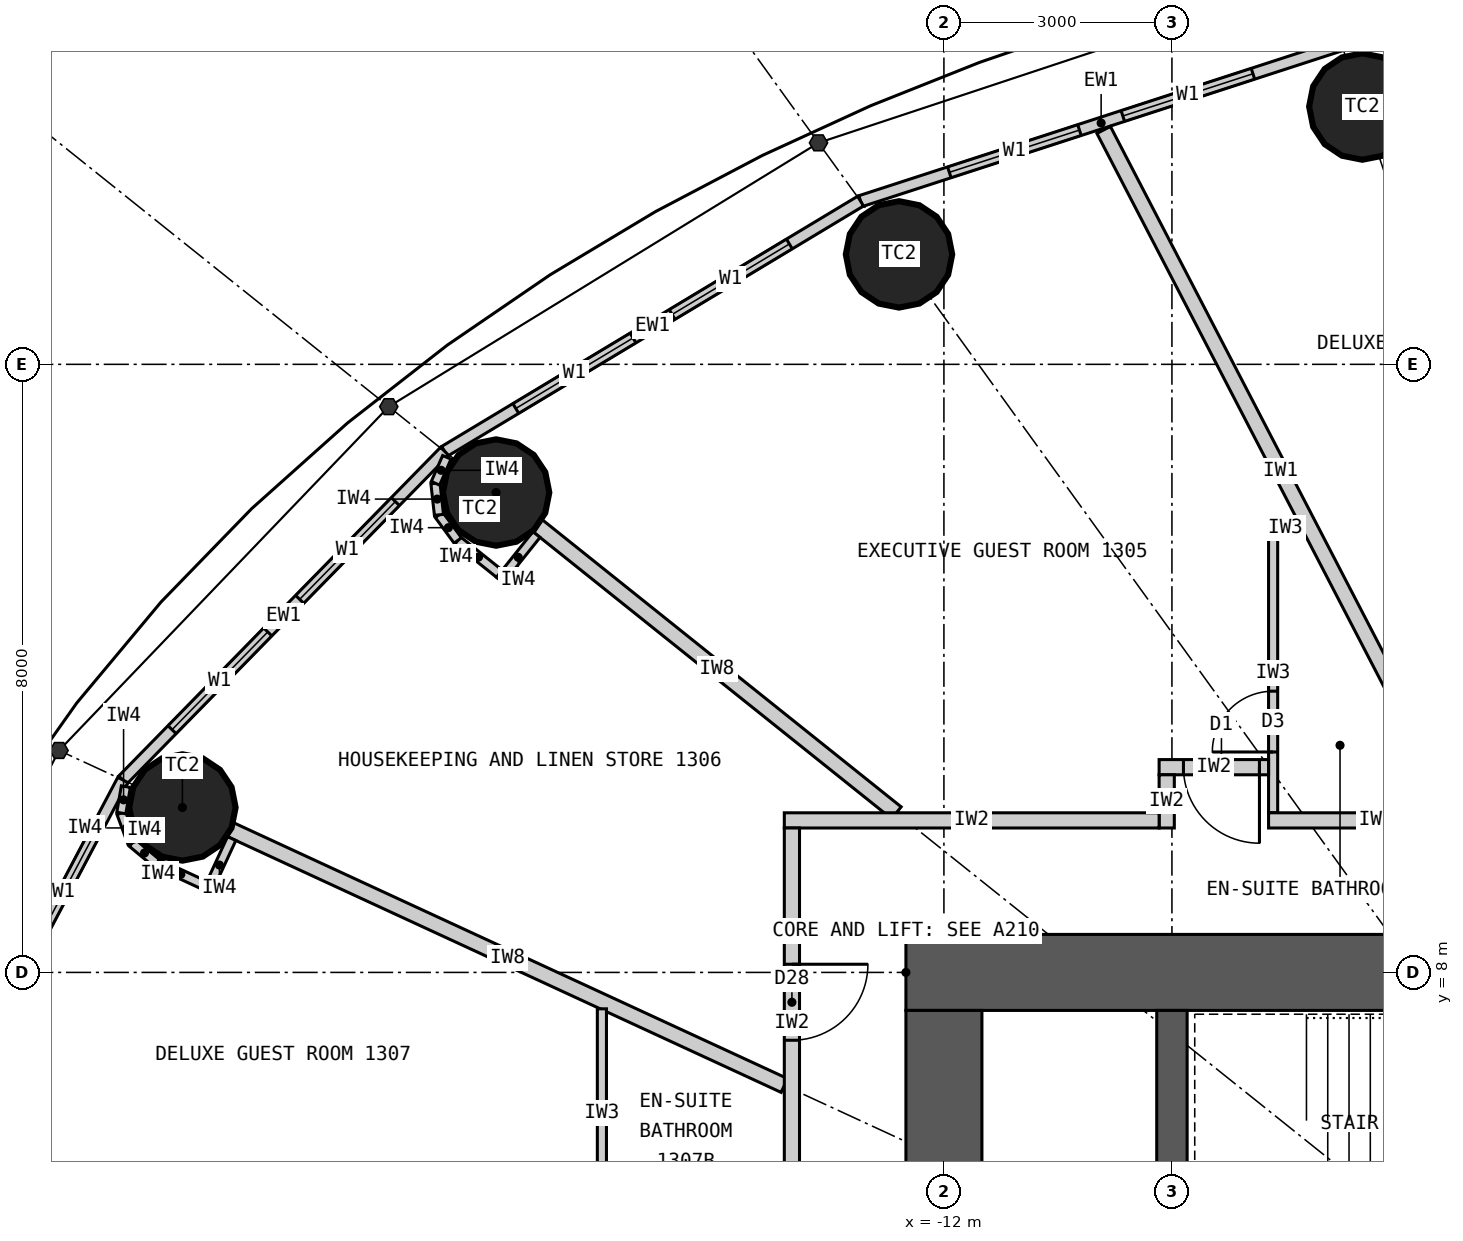
"""IFC4 building model, lengths in metres.
Left out: names, types, materials, properties, quantities, classifications, styles, units other than length and angle.
Written with IfcOpenShell. Run it as: python <this file> out.ifc"""

import sys

from ifc_helpers import new_model, si_unit, direction, frame, frame_2d, origin, origin_2d, place, context, subcontext, project, spatial, rectangle, circle, extrude, element, fill, save


model = new_model("IFC4")
c1 = context("Model", 3, precision=1e-05, world=origin(), true_north=direction((0.0, 1.0)))
c2 = subcontext(c1, "Body", "Model", "MODEL_VIEW")
j1 = project(units=[si_unit("LENGTHUNIT", "METRE"), si_unit("PLANEANGLEUNIT", "RADIAN")], contexts=[c1])
p1 = place(None, origin())
s1 = spatial("IfcSite", under=j1, at=p1, CompositionType="ELEMENT")
p2 = place(p1, origin())
s2 = spatial("IfcBuilding", under=s1, at=p2, CompositionType="ELEMENT")
p3 = place(p2, frame((0.0, 0.0, 57.3)))
s3 = spatial("IfcBuildingStorey", under=s2, at=p3, CompositionType="ELEMENT", Elevation=57.3)
for number, where, z_axis, x_axis in (
    (1, (-6.495, 19.391, 0.0), (0.0, 0.0, 1.0), (1.0, 0.0, 0.0)),
    (2, (-12.591, 17.447, 0.0), (0.0, 0.0, 1.0), (1.0, 0.0, 0.0)),
    (3, (-17.892, 14.313, 0.0), (0.0, 0.0, 1.0), (1.0, 0.0, 0.0)),
    (4, (-22.019, 10.17, 0.0), (0.0, 0.0, 1.0), (1.0, 0.0, 0.0)),
):
    element("IfcColumn", number, at=place(p3, frame(where, z_axis=z_axis, x_axis=x_axis)), inside=s3, PredefinedType="COLUMN", context=c2, shape_type="SweptSolid", body=[
        extrude(circle(Radius=0.7, at=origin_2d()), origin(), (0.0, 0.0, 1.0), 3.3),
    ])
p4 = place(p3, frame((-12.5, 8.0, 0.0), z_axis=(0.0, 0.0, 1.0), x_axis=(1.0, 0.0, 0.0)))
e5 = element("IfcWall", 5, at=p4, inside=s3, PredefinedType="SHEAR", context=c2, shape_type="SweptSolid", body=[
    extrude(rectangle(XDim=25.0, YDim=1.0, at=frame_2d((12.5, 0.0))), origin(), (0.0, 0.0, 1.0), 3.3),
])
p5 = place(p4, frame((11.2, 0.0, 0.0)))
e6 = element("IfcOpeningElement", 6, at=p5, cuts=e5, PredefinedType="OPENING", context=c2, shape_type="SweptSolid", body=[
    extrude(rectangle(XDim=1.2, YDim=2.2, at=frame_2d((0.6, 1.1))), frame((0.0, 0.51, 0.0), z_axis=(0.0, -1.0, 0.0), x_axis=(1.0, 0.0, 0.0)), (0.0, 0.0, 1.0), 1.02),
])
p6 = place(p4, frame((18.8, 0.0, 0.0)))
e7 = element("IfcOpeningElement", 7, at=p6, cuts=e5, PredefinedType="OPENING", context=c2, shape_type="SweptSolid", body=[
    extrude(rectangle(XDim=0.9, YDim=2.2, at=frame_2d((0.45, 1.1))), frame((0.0, 0.51, 0.0), z_axis=(0.0, -1.0, 0.0), x_axis=(1.0, 0.0, 0.0)), (0.0, 0.0, 1.0), 1.02),
])
p7 = place(p3, frame((-12.0, 7.5, 0.0), z_axis=(0.0, 0.0, 1.0), x_axis=(0.0, -1.0, 0.0)))
e8 = element("IfcWall", 8, at=p7, inside=s3, PredefinedType="SHEAR", context=c2, shape_type="SweptSolid", body=[
    extrude(rectangle(XDim=15.0, YDim=1.0, at=frame_2d((7.5, 0.0))), origin(), (0.0, 0.0, 1.0), 3.3),
])
p8 = place(p7, frame((6.6, 0.0, 0.0)))
e9 = element("IfcOpeningElement", 9, at=p8, cuts=e8, PredefinedType="OPENING", context=c2, shape_type="SweptSolid", body=[
    extrude(rectangle(XDim=1.8, YDim=2.2, at=frame_2d((0.9, 1.1))), frame((0.0, 0.51, 0.0), z_axis=(0.0, -1.0, 0.0), x_axis=(1.0, 0.0, 0.0)), (0.0, 0.0, 1.0), 1.02),
])
p9 = place(p3, frame((-9.0, 4.5, 0.0), z_axis=(0.0, 0.0, 1.0), x_axis=(0.0, 1.0, 0.0)))
e10 = element("IfcWall", 10, at=p9, inside=s3, PredefinedType="SHEAR", context=c2, shape_type="SweptSolid", body=[
    extrude(rectangle(XDim=3.0, YDim=0.4, at=frame_2d((1.5, 0.0))), origin(), (0.0, 0.0, 1.0), 3.3),
])
p10 = place(p3, frame((-6.766, 20.202, 0.0), z_axis=(0.0, 0.0, 1.0), x_axis=(-0.951137534625, -0.308767534285, 0.0)))
e11 = element("IfcWall", 11, at=p10, inside=s3, PredefinedType="ELEMENTEDWALL", context=c2, shape_type="SweptSolid", body=[
    extrude(rectangle(XDim=6.655, YDim=0.15, at=frame_2d((3.328, 0.0))), origin(), (0.0, 0.0, 1.0), 3.12),
])
p11 = place(p10, frame((1.228, 0.0, 0.9)))
e12 = element("IfcOpeningElement", 12, at=p11, cuts=e11, PredefinedType="OPENING", context=c2, shape_type="SweptSolid", body=[
    extrude(rectangle(XDim=1.8, YDim=1.9, at=frame_2d((0.9, 0.95))), frame((0.0, 0.085, 0.0), z_axis=(0.0, -1.0, 0.0), x_axis=(1.0, 0.0, 0.0)), (0.0, 0.0, 1.0), 0.17),
])
p12 = place(p10, frame((3.628, 0.0, 0.9)))
e13 = element("IfcOpeningElement", 13, at=p12, cuts=e11, PredefinedType="OPENING", context=c2, shape_type="SweptSolid", body=[
    extrude(rectangle(XDim=1.8, YDim=1.9, at=frame_2d((0.9, 0.95))), frame((0.0, 0.085, 0.0), z_axis=(0.0, -1.0, 0.0), x_axis=(1.0, 0.0, 0.0)), (0.0, 0.0, 1.0), 0.17),
])
p13 = place(p3, frame((-13.096, 18.147, 0.0), z_axis=(0.0, 0.0, 1.0), x_axis=(-0.856983180864, -0.515344377787, 0.0)))
e14 = element("IfcWall", 14, at=p13, inside=s3, PredefinedType="ELEMENTEDWALL", context=c2, shape_type="SweptSolid", body=[
    extrude(rectangle(XDim=6.386, YDim=0.15, at=frame_2d((3.193, 0.0))), origin(), (0.0, 0.0, 1.0), 3.12),
])
p14 = place(p13, frame((1.093, 0.0, 0.9)))
e15 = element("IfcOpeningElement", 15, at=p14, cuts=e14, PredefinedType="OPENING", context=c2, shape_type="SweptSolid", body=[
    extrude(rectangle(XDim=1.8, YDim=1.9, at=frame_2d((0.9, 0.95))), frame((0.0, 0.085, 0.0), z_axis=(0.0, -1.0, 0.0), x_axis=(1.0, 0.0, 0.0)), (0.0, 0.0, 1.0), 0.17),
])
p15 = place(p13, frame((3.493, 0.0, 0.9)))
e16 = element("IfcOpeningElement", 16, at=p15, cuts=e14, PredefinedType="OPENING", context=c2, shape_type="SweptSolid", body=[
    extrude(rectangle(XDim=1.8, YDim=1.9, at=frame_2d((0.9, 0.95))), frame((0.0, 0.085, 0.0), z_axis=(0.0, -1.0, 0.0), x_axis=(1.0, 0.0, 0.0)), (0.0, 0.0, 1.0), 0.17),
])
p16 = place(p3, frame((-18.57, 14.856, 0.0), z_axis=(0.0, 0.0, 1.0), x_axis=(-0.699602905915, -0.714531856557, 0.0)))
e17 = element("IfcWall", 17, at=p16, inside=s3, PredefinedType="ELEMENTEDWALL", context=c2, shape_type="SweptSolid", body=[
    extrude(rectangle(XDim=6.051, YDim=0.15, at=frame_2d((3.025, 0.0))), origin(), (0.0, 0.0, 1.0), 3.12),
])
p17 = place(p16, frame((0.926, 0.0, 0.9)))
e18 = element("IfcOpeningElement", 18, at=p17, cuts=e17, PredefinedType="OPENING", context=c2, shape_type="SweptSolid", body=[
    extrude(rectangle(XDim=1.8, YDim=1.9, at=frame_2d((0.9, 0.95))), frame((0.0, 0.085, 0.0), z_axis=(0.0, -1.0, 0.0), x_axis=(1.0, 0.0, 0.0)), (0.0, 0.0, 1.0), 0.17),
])
p18 = place(p16, frame((3.325, 0.0, 0.9)))
e19 = element("IfcOpeningElement", 19, at=p18, cuts=e17, PredefinedType="OPENING", context=c2, shape_type="SweptSolid", body=[
    extrude(rectangle(XDim=1.8, YDim=1.9, at=frame_2d((0.9, 0.95))), frame((0.0, 0.085, 0.0), z_axis=(0.0, -1.0, 0.0), x_axis=(1.0, 0.0, 0.0)), (0.0, 0.0, 1.0), 0.17),
])
p19 = place(p3, frame((-22.803, 10.532, 0.0), z_axis=(0.0, 0.0, 1.0), x_axis=(-0.467296867008, -0.884100468321, 0.0)))
e20 = element("IfcWall", 20, at=p19, inside=s3, PredefinedType="ELEMENTEDWALL", context=c2, shape_type="SweptSolid", body=[
    extrude(rectangle(XDim=5.734, YDim=0.15, at=frame_2d((2.867, 0.0))), origin(), (0.0, 0.0, 1.0), 3.12),
])
p20 = place(p19, frame((0.767, 0.0, 0.9)))
e21 = element("IfcOpeningElement", 21, at=p20, cuts=e20, PredefinedType="OPENING", context=c2, shape_type="SweptSolid", body=[
    extrude(rectangle(XDim=1.8, YDim=1.9, at=frame_2d((0.9, 0.95))), frame((0.0, 0.085, 0.0), z_axis=(0.0, -1.0, 0.0), x_axis=(1.0, 0.0, 0.0)), (0.0, 0.0, 1.0), 0.17),
])
p21 = place(p19, frame((3.167, 0.0, 0.9)))
e22 = element("IfcOpeningElement", 22, at=p21, cuts=e20, PredefinedType="OPENING", context=c2, shape_type="SweptSolid", body=[
    extrude(rectangle(XDim=1.8, YDim=1.9, at=frame_2d((0.9, 0.95))), frame((0.0, 0.085, 0.0), z_axis=(0.0, -1.0, 0.0), x_axis=(1.0, 0.0, 0.0)), (0.0, 0.0, 1.0), 0.17),
])
p22 = place(p3, frame((-5.239, 10.1, 0.0), z_axis=(0.0, 0.0, 1.0), x_axis=(-0.460422783389, 0.887699758103, 0.0)))
e23 = element("IfcWall", 23, at=p22, inside=s3, PredefinedType="PARTITIONING", context=c2, shape_type="SweptSolid", body=[
    extrude(rectangle(XDim=10.12, YDim=0.2, at=frame_2d((5.06, 0.0))), origin(), (0.0, 0.0, 1.0), 3.12),
])
p23 = place(p3, frame((-12.625, 10.1, 0.0), z_axis=(0.0, 0.0, 1.0), x_axis=(-0.780892451574, 0.624665493744, 0.0)))
e24 = element("IfcWall", 24, at=p23, inside=s3, PredefinedType="PARTITIONING", context=c2, shape_type="SweptSolid", body=[
    extrude(rectangle(XDim=6.045, YDim=0.2, at=frame_2d((3.022, 0.0))), origin(), (0.0, 0.0, 1.0), 2.32),
])
p24 = place(p3, frame((-14.1, 6.512, 0.0), z_axis=(0.0, 0.0, 1.0), x_axis=(-0.907832871056, 0.419332181247, 0.0)))
e25 = element("IfcWall", 25, at=p24, inside=s3, PredefinedType="PARTITIONING", context=c2, shape_type="SweptSolid", body=[
    extrude(rectangle(XDim=8.023, YDim=0.2, at=frame_2d((4.011, 0.0))), origin(), (0.0, 0.0, 1.0), 2.32),
])
p25 = place(p3, frame((-7.284, 13.85, 0.0), z_axis=(0.0, 0.0, 1.0), x_axis=(-1.0, 0.0, 0.0)))
e26 = element("IfcWall", 26, at=p25, inside=s3, PredefinedType="PARTITIONING", context=c2, shape_type="SweptSolid", body=[
    extrude(rectangle(XDim=0.445, YDim=0.12, at=frame_2d((0.222, 0.0))), origin(), (0.0, 0.0, 1.0), 3.12),
])
p26 = place(p3, frame((-7.669, 10.1, 0.0), z_axis=(0.0, 0.0, 1.0), x_axis=(0.0, 1.0, 0.0)))
e27 = element("IfcWall", 27, at=p26, inside=s3, PredefinedType="PARTITIONING", context=c2, shape_type="SweptSolid", body=[
    extrude(rectangle(XDim=3.69, YDim=0.12, at=frame_2d((1.845, 0.0))), origin(), (0.0, 0.0, 1.0), 3.12),
])
p27 = place(p26, frame((0.8, 0.0, 0.0)))
e28 = element("IfcOpeningElement", 28, at=p27, cuts=e27, PredefinedType="OPENING", context=c2, shape_type="SweptSolid", body=[
    extrude(rectangle(XDim=0.8, YDim=2.1, at=frame_2d((0.4, 1.05))), frame((0.0, 0.07, 0.0), z_axis=(0.0, -1.0, 0.0), x_axis=(1.0, 0.0, 0.0)), (0.0, 0.0, 1.0), 0.14),
])
p28 = place(p3, frame((-16.5, 7.521, 0.0), z_axis=(0.0, 0.0, 1.0), x_axis=(0.0, -1.0, 0.0)))
e29 = element("IfcWall", 29, at=p28, inside=s3, PredefinedType="PARTITIONING", context=c2, shape_type="SweptSolid", body=[
    extrude(rectangle(XDim=2.749, YDim=0.12, at=frame_2d((1.374, 0.0))), origin(), (0.0, 0.0, 1.0), 3.12),
])
p29 = place(p3, frame((-9.169, 10.7, 0.0), z_axis=(0.0, 0.0, 1.0), x_axis=(1.0, 0.0, 0.0)))
e30 = element("IfcWall", 30, at=p29, inside=s3, PredefinedType="PARTITIONING", context=c2, shape_type="SweptSolid", body=[
    extrude(rectangle(XDim=1.44, YDim=0.2, at=frame_2d((0.72, 0.0))), origin(), (0.0, 0.0, 1.0), 3.12),
])
p30 = place(p29, frame((0.32, 0.0, 0.0)))
e31 = element("IfcOpeningElement", 31, at=p30, cuts=e30, PredefinedType="OPENING", context=c2, shape_type="SweptSolid", body=[
    extrude(rectangle(XDim=1.0, YDim=2.2, at=frame_2d((0.5, 1.1))), frame((0.0, 0.11, 0.0), z_axis=(0.0, -1.0, 0.0), x_axis=(1.0, 0.0, 0.0)), (0.0, 0.0, 1.0), 0.22),
])
p31 = place(p3, frame((-9.069, 9.9, 0.0), z_axis=(0.0, 0.0, 1.0), x_axis=(0.0, 1.0, 0.0)))
e32 = element("IfcWall", 32, at=p31, inside=s3, PredefinedType="PARTITIONING", context=c2, shape_type="SweptSolid", body=[
    extrude(rectangle(XDim=0.7, YDim=0.2, at=frame_2d((0.35, 0.0))), origin(), (0.0, 0.0, 1.0), 3.12),
])
p32 = place(p3, frame((-14.1, 10.0, 0.0), z_axis=(0.0, 0.0, 1.0), x_axis=(1.0, 0.0, 0.0)))
e33 = element("IfcWall", 33, at=p32, inside=s3, PredefinedType="PARTITIONING", context=c2, shape_type="SweptSolid", body=[
    extrude(rectangle(XDim=4.931, YDim=0.2, at=frame_2d((2.466, 0.0))), origin(), (0.0, 0.0, 1.0), 3.12),
])
p33 = place(p3, frame((-7.729, 10.0, 0.0), z_axis=(0.0, 0.0, 1.0), x_axis=(1.0, 0.0, 0.0)))
e34 = element("IfcWall", 34, at=p33, inside=s3, PredefinedType="PARTITIONING", context=c2, shape_type="SweptSolid", body=[
    extrude(rectangle(XDim=2.833, YDim=0.2, at=frame_2d((1.417, 0.0))), origin(), (0.0, 0.0, 1.0), 3.12),
])
p34 = place(p3, frame((-14.0, 9.9, 0.0), z_axis=(0.0, 0.0, 1.0), x_axis=(0.0, -1.0, 0.0)))
e35 = element("IfcWall", 35, at=p34, inside=s3, PredefinedType="PARTITIONING", context=c2, shape_type="SweptSolid", body=[
    extrude(rectangle(XDim=5.127, YDim=0.2, at=frame_2d((2.564, 0.0))), origin(), (0.0, 0.0, 1.0), 3.12),
])
p35 = place(p34, frame((1.792, 0.0, 0.0)))
e36 = element("IfcOpeningElement", 36, at=p35, cuts=e35, PredefinedType="OPENING", context=c2, shape_type="SweptSolid", body=[
    extrude(rectangle(XDim=1.0, YDim=2.2, at=frame_2d((0.5, 1.1))), frame((0.0, 0.11, 0.0), z_axis=(0.0, -1.0, 0.0), x_axis=(1.0, 0.0, 0.0)), (0.0, 0.0, 1.0), 0.22),
])
p36 = place(p3, frame((-17.361, 13.76, 0.0), z_axis=(0.0, 0.0, 1.0), x_axis=(-0.624501042889, -0.781023973659, 0.0)))
e37 = element("IfcWall", 37, at=p36, inside=s3, PredefinedType="PARTITIONING", context=c2, shape_type="SweptSolid", body=[
    extrude(rectangle(XDim=0.767, YDim=0.12, at=frame_2d((0.384, 0.0))), origin(), (0.0, 0.0, 1.0), 3.12),
])
p37 = place(p3, frame((-17.85, 13.246, 0.0), z_axis=(0.0, 0.0, 1.0), x_axis=(-0.780902834923, 0.62465251333, 0.0)))
e38 = element("IfcWall", 38, at=p37, inside=s3, PredefinedType="PARTITIONING", context=c2, shape_type="SweptSolid", body=[
    extrude(rectangle(XDim=0.7, YDim=0.12, at=frame_2d((0.35, 0.0))), origin(), (0.0, 0.0, 1.0), 3.12),
])
for number, where, z_axis, x_axis in (
    (39, (-18.396, 13.683, 0.0), (0.0, 0.0, 1.0), (-0.592, 0.806, 0.0)),
    (40, (-18.644, 14.02, 0.0), (0.0, 0.0, 1.0), (-0.11, 0.994, 0.0)),
):
    element("IfcWall", number, at=place(p3, frame(where, z_axis=z_axis, x_axis=x_axis)), inside=s3, PredefinedType="PARTITIONING", context=c2, shape_type="SweptSolid", body=[
        extrude(rectangle(XDim=0.418, YDim=0.12, at=frame_2d((0.209, 0.0))), origin(), (0.0, 0.0, 1.0), 3.12),
    ])
p38 = place(p3, frame((-18.69, 14.435, 0.0), z_axis=(0.0, 0.0, 1.0), x_axis=(0.401093412634, 0.91603715773, 0.0)))
e41 = element("IfcWall", 41, at=p38, inside=s3, PredefinedType="PARTITIONING", context=c2, shape_type="SweptSolid", body=[
    extrude(rectangle(XDim=0.373, YDim=0.12, at=frame_2d((0.187, 0.0))), origin(), (0.0, 0.0, 1.0), 3.12),
])
p39 = place(p3, frame((-21.371, 9.761, 0.0), z_axis=(0.0, 0.0, 1.0), x_axis=(-0.419259891039, -0.907866258744, 0.0)))
e42 = element("IfcWall", 42, at=p39, inside=s3, PredefinedType="PARTITIONING", context=c2, shape_type="SweptSolid", body=[
    extrude(rectangle(XDim=0.768, YDim=0.12, at=frame_2d((0.384, 0.0))), origin(), (0.0, 0.0, 1.0), 3.12),
])
p40 = place(p3, frame((-21.722, 9.144, 0.0), z_axis=(0.0, 0.0, 1.0), x_axis=(-0.907877701396, 0.419235112208, 0.0)))
e43 = element("IfcWall", 43, at=p40, inside=s3, PredefinedType="PARTITIONING", context=c2, shape_type="SweptSolid", body=[
    extrude(rectangle(XDim=0.7, YDim=0.12, at=frame_2d((0.35, 0.0))), origin(), (0.0, 0.0, 1.0), 3.12),
])
p41 = place(p3, frame((-22.358, 9.437, 0.0), z_axis=(0.0, 0.0, 1.0), x_axis=(-0.768412687942, 0.639954639806, 0.0)))
e44 = element("IfcWall", 44, at=p41, inside=s3, PredefinedType="PARTITIONING", context=c2, shape_type="SweptSolid", body=[
    extrude(rectangle(XDim=0.418, YDim=0.12, at=frame_2d((0.209, 0.0))), origin(), (0.0, 0.0, 1.0), 3.12),
])
p42 = place(p3, frame((-22.679, 9.705, 0.0), z_axis=(0.0, 0.0, 1.0), x_axis=(-0.345164001646, 0.938542386879, 0.0)))
e45 = element("IfcWall", 45, at=p42, inside=s3, PredefinedType="PARTITIONING", context=c2, shape_type="SweptSolid", body=[
    extrude(rectangle(XDim=0.418, YDim=0.12, at=frame_2d((0.209, 0.0))), origin(), (0.0, 0.0, 1.0), 3.12),
])
p43 = place(p3, frame((-22.823, 10.097, 0.0), z_axis=(0.0, 0.0, 1.0), x_axis=(0.169674995186, 0.985500074079, 0.0)))
e46 = element("IfcWall", 46, at=p43, inside=s3, PredefinedType="PARTITIONING", context=c2, shape_type="SweptSolid", body=[
    extrude(rectangle(XDim=0.353, YDim=0.12, at=frame_2d((0.176, 0.0))), origin(), (0.0, 0.0, 1.0), 3.12),
])
p44 = place(p11, origin())
e47 = element("IfcWindow", 47, at=p44, inside=s3, PartitioningType="SINGLE_PANEL", PredefinedType="WINDOW", context=c2, shape_type="SweptSolid", body=[
    extrude(rectangle(XDim=1.8, YDim=1.9, at=frame_2d((0.9, 0.95))), frame((0.0, 0.03, 0.0), z_axis=(0.0, -1.0, 0.0), x_axis=(1.0, 0.0, 0.0)), (0.0, 0.0, 1.0), 0.06),
])
fill(e12, e47)
p45 = place(p12, origin())
e48 = element("IfcWindow", 48, at=p45, inside=s3, PartitioningType="SINGLE_PANEL", PredefinedType="WINDOW", context=c2, shape_type="SweptSolid", body=[
    extrude(rectangle(XDim=1.8, YDim=1.9, at=frame_2d((0.9, 0.95))), frame((0.0, 0.03, 0.0), z_axis=(0.0, -1.0, 0.0), x_axis=(1.0, 0.0, 0.0)), (0.0, 0.0, 1.0), 0.06),
])
fill(e13, e48)
p46 = place(p14, origin())
e49 = element("IfcWindow", 49, at=p46, inside=s3, PartitioningType="SINGLE_PANEL", PredefinedType="WINDOW", context=c2, shape_type="SweptSolid", body=[
    extrude(rectangle(XDim=1.8, YDim=1.9, at=frame_2d((0.9, 0.95))), frame((0.0, 0.03, 0.0), z_axis=(0.0, -1.0, 0.0), x_axis=(1.0, 0.0, 0.0)), (0.0, 0.0, 1.0), 0.06),
])
fill(e15, e49)
p47 = place(p15, origin())
e50 = element("IfcWindow", 50, at=p47, inside=s3, PartitioningType="SINGLE_PANEL", PredefinedType="WINDOW", context=c2, shape_type="SweptSolid", body=[
    extrude(rectangle(XDim=1.8, YDim=1.9, at=frame_2d((0.9, 0.95))), frame((0.0, 0.03, 0.0), z_axis=(0.0, -1.0, 0.0), x_axis=(1.0, 0.0, 0.0)), (0.0, 0.0, 1.0), 0.06),
])
fill(e16, e50)
p48 = place(p17, origin())
e51 = element("IfcWindow", 51, at=p48, inside=s3, PartitioningType="SINGLE_PANEL", PredefinedType="WINDOW", context=c2, shape_type="SweptSolid", body=[
    extrude(rectangle(XDim=1.8, YDim=1.9, at=frame_2d((0.9, 0.95))), frame((0.0, 0.03, 0.0), z_axis=(0.0, -1.0, 0.0), x_axis=(1.0, 0.0, 0.0)), (0.0, 0.0, 1.0), 0.06),
])
fill(e18, e51)
p49 = place(p18, origin())
e52 = element("IfcWindow", 52, at=p49, inside=s3, PartitioningType="SINGLE_PANEL", PredefinedType="WINDOW", context=c2, shape_type="SweptSolid", body=[
    extrude(rectangle(XDim=1.8, YDim=1.9, at=frame_2d((0.9, 0.95))), frame((0.0, 0.03, 0.0), z_axis=(0.0, -1.0, 0.0), x_axis=(1.0, 0.0, 0.0)), (0.0, 0.0, 1.0), 0.06),
])
fill(e19, e52)
p50 = place(p20, origin())
e53 = element("IfcWindow", 53, at=p50, inside=s3, PartitioningType="SINGLE_PANEL", PredefinedType="WINDOW", context=c2, shape_type="SweptSolid", body=[
    extrude(rectangle(XDim=1.8, YDim=1.9, at=frame_2d((0.9, 0.95))), frame((0.0, 0.03, 0.0), z_axis=(0.0, -1.0, 0.0), x_axis=(1.0, 0.0, 0.0)), (0.0, 0.0, 1.0), 0.06),
])
fill(e21, e53)
p51 = place(p27, origin())
e54 = element("IfcDoor", 54, at=p51, inside=s3, OperationType="SINGLE_SWING_LEFT", PredefinedType="DOOR", context=c2, shape_type="SweptSolid", body=[
    extrude(rectangle(XDim=0.8, YDim=2.1, at=frame_2d((0.4, 1.05))), frame((0.0, 0.025, 0.0), z_axis=(0.0, -1.0, 0.0), x_axis=(1.0, 0.0, 0.0)), (0.0, 0.0, 1.0), 0.05),
])
fill(e28, e54)
p52 = place(p30, origin())
e55 = element("IfcDoor", 55, at=p52, inside=s3, OperationType="SINGLE_SWING_RIGHT", PredefinedType="DOOR", context=c2, shape_type="SweptSolid", body=[
    extrude(rectangle(XDim=1.0, YDim=2.2, at=frame_2d((0.5, 1.1))), frame((0.0, 0.025, 0.0), z_axis=(0.0, -1.0, 0.0), x_axis=(1.0, 0.0, 0.0)), (0.0, 0.0, 1.0), 0.05),
])
fill(e31, e55)
p53 = place(p35, origin())
e56 = element("IfcDoor", 56, at=p53, inside=s3, OperationType="SINGLE_SWING_LEFT", PredefinedType="DOOR", context=c2, shape_type="SweptSolid", body=[
    extrude(rectangle(XDim=1.0, YDim=2.2, at=frame_2d((0.5, 1.1))), frame((0.0, 0.025, 0.0), z_axis=(0.0, -1.0, 0.0), x_axis=(1.0, 0.0, 0.0)), (0.0, 0.0, 1.0), 0.05),
])
fill(e36, e56)
save(model, sys.argv[1])
